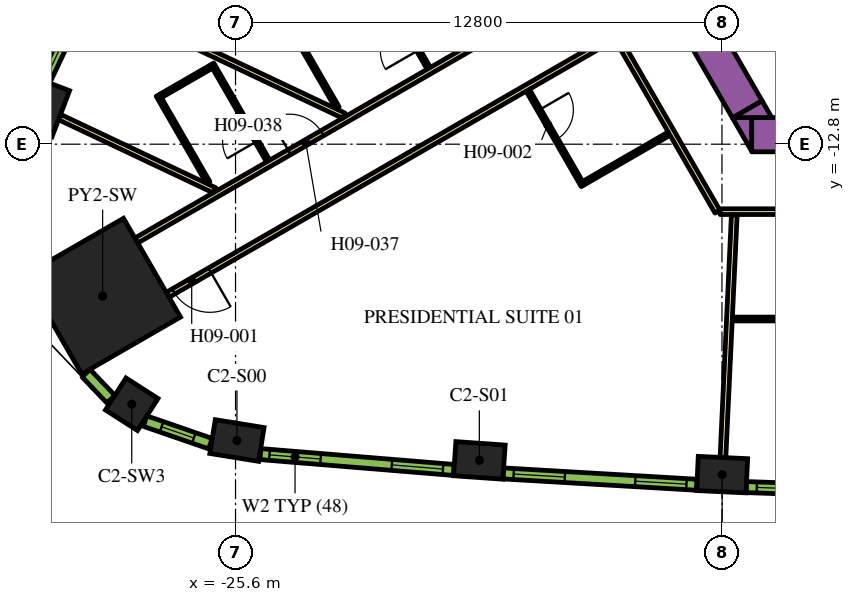
"""IFC4 building model, lengths in metres.
Left out: names, types, materials, properties, quantities, classifications, styles, units other than length and angle.
Written with IfcOpenShell. Run it as: python <this file> out.ifc"""

import sys

from ifc_helpers import new_model, si_unit, direction, frame, frame_2d, origin, origin_2d, place, context, subcontext, project, spatial, polyline, rectangle, outline, extrude, element, fill, save


model = new_model("IFC4")
c1 = context("Model", 3, precision=1e-05, world=origin(), true_north=direction((0.0, 1.0)))
c2 = subcontext(c1, "Body", "Model", "MODEL_VIEW")
j1 = project(units=[si_unit("LENGTHUNIT", "METRE"), si_unit("PLANEANGLEUNIT", "RADIAN")], contexts=[c1])
p1 = place(None, origin())
s1 = spatial("IfcSite", under=j1, at=p1, CompositionType="ELEMENT")
p2 = place(p1, origin())
s2 = spatial("IfcBuilding", under=s1, at=p2, CompositionType="ELEMENT")
p3 = place(p2, frame((0.0, 0.0, 126.6)))
s3 = spatial("IfcBuildingStorey", under=s2, at=p3, CompositionType="ELEMENT", Elevation=126.6)
p4 = place(p3, frame((-29.097, -16.799, 0.0), z_axis=(0.0, 0.0, 1.0), x_axis=(-0.866025403784, -0.5, 0.0)))
e1 = element("IfcColumn", 1, at=p4, inside=s3, PredefinedType="COLUMN", context=c2, shape_type="SweptSolid", body=[
    extrude(rectangle(XDim=3.0, YDim=3.0, at=origin_2d()), origin(), (0.0, 0.0, 1.0), 3.9),
])
for number, where, z_axis, x_axis in (
    (2, (-25.563, -20.597, 0.0), (0.0, 0.0, 1.0), (0.987, -0.159, 0.0)),
    (3, (-19.184, -21.12, 0.0), (0.0, 0.0, 1.0), (0.998, -0.07, 0.0)),
    (4, (-12.795, -21.494, 0.0), (0.0, 0.0, 1.0), (0.999, -0.047, 0.0)),
    (5, (-30.619, -11.839, 0.0), (0.0, 0.0, 1.0), (-0.355, -0.935, 0.0)),
):
    element("IfcColumn", number, at=place(p3, frame(where, z_axis=z_axis, x_axis=x_axis)), inside=s3, PredefinedType="COLUMN", context=c2, shape_type="SweptSolid", body=[
        extrude(rectangle(XDim=1.3, YDim=0.9, at=origin_2d()), origin(), (0.0, 0.0, 1.0), 3.9),
    ])
p5 = place(p3, frame((-28.331, -19.643, 0.0), z_axis=(0.0, 0.0, 1.0), x_axis=(0.841700252504, -0.53994507585, 0.0)))
e6 = element("IfcColumn", 6, at=p5, inside=s3, PredefinedType="COLUMN", context=c2, shape_type="SweptSolid", body=[
    extrude(rectangle(XDim=1.0, YDim=1.0, at=origin_2d()), origin(), (0.0, 0.0, 1.0), 3.9),
])
p6 = place(p3, frame((-12.019, -12.55, 0.0), z_axis=(0.0, 0.0, 1.0), x_axis=(1.0, 0.0, 0.0)))
e7 = element("IfcWall", 7, at=p6, inside=s3, PredefinedType="SOLIDWALL", context=c2, shape_type="SweptSolid", body=[
    extrude(rectangle(XDim=21.63, YDim=0.9, at=frame_2d((10.815, 0.0))), origin(), (0.0, 0.0, 1.0), 3.9),
])
p7 = place(p3, origin())
e8 = element("IfcWall", 8, at=p7, inside=s3, PredefinedType="SOLIDWALL", context=c2, shape_type="SweptSolid", body=[
    extrude(outline(polyline([(-12.529, -12.1), (-12.021, -12.1), (-12.021, -12.98), (-12.529, -12.1)])), origin(), (0.0, 0.0, 1.0), 3.9),
])
p8 = place(p3, frame((-12.134, -11.883, 0.0), z_axis=(0.0, 0.0, 1.0), x_axis=(-0.500005339912, 0.866022320763, 0.0)))
e9 = element("IfcWall", 9, at=p8, inside=s3, PredefinedType="SOLIDWALL", context=c2, shape_type="SweptSolid", body=[
    extrude(rectangle(XDim=9.488, YDim=0.9, at=frame_2d((4.744, 0.0))), origin(), (0.0, 0.0, 1.0), 3.9),
])
e10 = element("IfcWall", 10, at=p7, inside=s3, PredefinedType="SOLIDWALL", context=c2, shape_type="SweptSolid", body=[
    extrude(outline(polyline([(-11.489, -12.1), (-12.505, -12.1), (-11.743, -11.66), (-11.489, -12.1)])), origin(), (0.0, 0.0, 1.0), 3.9),
])
p9 = place(p3, frame((-28.211, -15.335, 0.0), z_axis=(0.0, 0.0, 1.0), x_axis=(0.866025884867, 0.49999916674, 0.0)))
e11 = element("IfcWall", 11, at=p9, inside=s3, PredefinedType="PARTITIONING", context=c2, shape_type="SweptSolid", body=[
    extrude(rectangle(XDim=13.543, YDim=0.15, at=frame_2d((6.772, 0.0))), origin(), (0.0, 0.0, 1.0), 2.75),
])
p10 = place(p9, frame((12.114, 0.0, 0.0)))
e12 = element("IfcOpeningElement", 12, at=p10, cuts=e11, PredefinedType="OPENING", context=c2, shape_type="SweptSolid", body=[
    extrude(rectangle(XDim=1.1, YDim=2.1, at=frame_2d((0.55, 1.05))), frame((0.0, 0.085, 0.0), z_axis=(0.0, -1.0, 0.0), x_axis=(1.0, 0.0, 0.0)), (0.0, 0.0, 1.0), 0.17),
])
p11 = place(p9, frame((4.65, 0.0, 0.0)))
e13 = element("IfcOpeningElement", 13, at=p11, cuts=e11, PredefinedType="OPENING", context=c2, shape_type="SweptSolid", body=[
    extrude(rectangle(XDim=1.0, YDim=2.1, at=frame_2d((0.5, 1.05))), frame((0.0, 0.085, 0.0), z_axis=(0.0, -1.0, 0.0), x_axis=(1.0, 0.0, 0.0)), (0.0, 0.0, 1.0), 0.17),
])
p12 = place(p3, frame((-15.587, -9.952, 0.0), z_axis=(0.0, 0.0, 1.0), x_axis=(-0.866017869832, -0.500013048961, 0.0)))
e14 = element("IfcWall", 14, at=p12, inside=s3, PredefinedType="PARTITIONING", context=c2, shape_type="SweptSolid", body=[
    extrude(rectangle(XDim=13.624, YDim=0.15, at=frame_2d((6.812, 0.0))), origin(), (0.0, 0.0, 1.0), 2.75),
])
p13 = place(p12, frame((12.344, 0.0, 0.0)))
e15 = element("IfcOpeningElement", 15, at=p13, cuts=e14, PredefinedType="OPENING", context=c2, shape_type="SweptSolid", body=[
    extrude(rectangle(XDim=1.1, YDim=2.1, at=frame_2d((0.55, 1.05))), frame((0.0, 0.085, 0.0), z_axis=(0.0, -1.0, 0.0), x_axis=(1.0, 0.0, 0.0)), (0.0, 0.0, 1.0), 0.17),
])
p14 = place(p3, frame((-12.918, -14.575, 0.0), z_axis=(0.0, 0.0, 1.0), x_axis=(-0.500009150678, 0.866020120573, 0.0)))
e16 = element("IfcWall", 16, at=p14, inside=s3, PredefinedType="PARTITIONING", context=c2, shape_type="SweptSolid", body=[
    extrude(rectangle(XDim=5.258, YDim=0.15, at=frame_2d((2.629, 0.0))), origin(), (0.0, 0.0, 1.0), 2.75),
])
p15 = place(p3, frame((12.918, -14.575, 0.0), z_axis=(0.0, 0.0, 1.0), x_axis=(-1.0, 0.0, 0.0)))
e17 = element("IfcWall", 17, at=p15, inside=s3, PredefinedType="PARTITIONING", context=c2, shape_type="SweptSolid", body=[
    extrude(rectangle(XDim=25.766, YDim=0.15, at=frame_2d((12.883, 0.0))), origin(), (0.0, 0.0, 1.0), 2.75),
])
p16 = place(p15, frame((16.189, 0.0, 0.0)))
e18 = element("IfcOpeningElement", 18, at=p16, cuts=e17, PredefinedType="OPENING", context=c2, shape_type="SweptSolid", body=[
    extrude(rectangle(XDim=1.0, YDim=2.1, at=frame_2d((0.5, 1.05))), frame((0.0, 0.085, 0.0), z_axis=(0.0, -1.0, 0.0), x_axis=(1.0, 0.0, 0.0)), (0.0, 0.0, 1.0), 0.17),
])
p17 = place(p15, frame((14.882, 0.0, 0.0)))
e19 = element("IfcOpeningElement", 19, at=p17, cuts=e17, PredefinedType="OPENING", context=c2, shape_type="SweptSolid", body=[
    extrude(rectangle(XDim=1.0, YDim=2.1, at=frame_2d((0.5, 1.05))), frame((0.0, 0.085, 0.0), z_axis=(0.0, -1.0, 0.0), x_axis=(1.0, 0.0, 0.0)), (0.0, 0.0, 1.0), 0.17),
])
p18 = place(p15, frame((0.596, 0.0, 0.0)))
e20 = element("IfcOpeningElement", 20, at=p18, cuts=e17, PredefinedType="OPENING", context=c2, shape_type="SweptSolid", body=[
    extrude(rectangle(XDim=1.1, YDim=2.1, at=frame_2d((0.55, 1.05))), frame((0.0, 0.085, 0.0), z_axis=(0.0, -1.0, 0.0), x_axis=(1.0, 0.0, 0.0)), (0.0, 0.0, 1.0), 0.17),
])
p19 = place(p3, frame((-30.231, -12.085, 0.0), z_axis=(0.0, 0.0, 1.0), x_axis=(0.904001132572, -0.427530060122, 0.0)))
e21 = element("IfcWall", 21, at=p19, inside=s3, PredefinedType="PARTITIONING", context=c2, shape_type="SweptSolid", body=[
    extrude(rectangle(XDim=4.51, YDim=0.15, at=frame_2d((2.255, 0.0))), origin(), (0.0, 0.0, 1.0), 2.75),
])
p20 = place(p3, frame((-29.406, -8.901, 0.0), z_axis=(0.0, 0.0, 1.0), x_axis=(0.904002363742, -0.427527456836, 0.0)))
e22 = element("IfcWall", 22, at=p20, inside=s3, PredefinedType="PARTITIONING", context=c2, shape_type="SweptSolid", body=[
    extrude(rectangle(XDim=7.362, YDim=0.15, at=frame_2d((3.681, 0.0))), origin(), (0.0, 0.0, 1.0), 2.75),
])
p21 = place(p3, frame((-12.774, -21.045, 0.0), z_axis=(0.0, 0.0, 1.0), x_axis=(0.046750341626, 0.998906605023, 0.0)))
e23 = element("IfcWall", 23, at=p21, inside=s3, PredefinedType="PARTITIONING", context=c2, shape_type="SweptSolid", body=[
    extrude(rectangle(XDim=6.392, YDim=0.15, at=frame_2d((3.196, 0.0))), origin(), (0.0, 0.0, 1.0), 2.75),
])
p22 = place(p3, frame((-17.91, -11.38, 0.0), z_axis=(0.0, 0.0, 1.0), x_axis=(0.499987231761, -0.866032775405, 0.0)))
e24 = element("IfcWall", 24, at=p22, inside=s3, PredefinedType="PARTITIONING", context=c2, shape_type="SweptSolid", body=[
    extrude(rectangle(XDim=2.9, YDim=0.1, at=frame_2d((1.45, 0.0))), origin(), (0.0, 0.0, 1.0), 2.75),
])
p23 = place(p22, frame((0.6, 0.0, 0.0)))
e25 = element("IfcOpeningElement", 25, at=p23, cuts=e24, PredefinedType="OPENING", context=c2, shape_type="SweptSolid", body=[
    extrude(rectangle(XDim=0.9, YDim=2.1, at=frame_2d((0.45, 1.05))), frame((0.0, 0.06, 0.0), z_axis=(0.0, -1.0, 0.0), x_axis=(1.0, 0.0, 0.0)), (0.0, 0.0, 1.0), 0.12),
])
p24 = place(p3, frame((-16.442, -13.823, 0.0), z_axis=(0.0, 0.0, 1.0), x_axis=(0.866021400173, 0.500006934395, 0.0)))
e26 = element("IfcWall", 26, at=p24, inside=s3, PredefinedType="PARTITIONING", context=c2, shape_type="SweptSolid", body=[
    extrude(rectangle(XDim=2.6, YDim=0.1, at=frame_2d((1.3, 0.0))), origin(), (0.0, 0.0, 1.0), 2.75),
])
p25 = place(p3, frame((-10.072, -17.4, 0.0), z_axis=(0.0, 0.0, 1.0), x_axis=(-1.0, 0.0, 0.0)))
e27 = element("IfcWall", 27, at=p25, inside=s3, PredefinedType="PARTITIONING", context=c2, shape_type="SweptSolid", body=[
    extrude(rectangle(XDim=2.45, YDim=0.1, at=frame_2d((1.225, 0.0))), origin(), (0.0, 0.0, 1.0), 2.75),
])
p26 = place(p3, frame((-20.515, -10.805, 0.0), z_axis=(0.0, 0.0, 1.0), x_axis=(-0.49994636267, 0.866056369097, 0.0)))
e28 = element("IfcWall", 28, at=p26, inside=s3, PredefinedType="PARTITIONING", context=c2, shape_type="SweptSolid", body=[
    extrude(rectangle(XDim=2.8, YDim=0.1, at=frame_2d((1.4, 0.0))), origin(), (0.0, 0.0, 1.0), 2.75),
])
p27 = place(p26, frame((0.55, 0.0, 0.0)))
e29 = element("IfcOpeningElement", 29, at=p27, cuts=e28, PredefinedType="OPENING", context=c2, shape_type="SweptSolid", body=[
    extrude(rectangle(XDim=1.0, YDim=2.1, at=frame_2d((0.5, 1.05))), frame((0.0, 0.06, 0.0), z_axis=(0.0, -1.0, 0.0), x_axis=(1.0, 0.0, 0.0)), (0.0, 0.0, 1.0), 0.12),
])
p28 = place(p3, frame((-22.916, -11.845, 0.0), z_axis=(0.0, 0.0, 1.0), x_axis=(-0.500004234368, 0.866022959057, 0.0)))
e30 = element("IfcWall", 30, at=p28, inside=s3, PredefinedType="PARTITIONING", context=c2, shape_type="SweptSolid", body=[
    extrude(rectangle(XDim=2.5, YDim=0.1, at=frame_2d((1.25, 0.0))), origin(), (0.0, 0.0, 1.0), 2.75),
])
p29 = place(p3, frame((-24.74, -13.244, 0.0), z_axis=(0.0, 0.0, 1.0), x_axis=(-0.500037662692, 0.866003658127, 0.0)))
e31 = element("IfcWall", 31, at=p29, inside=s3, PredefinedType="PARTITIONING", context=c2, shape_type="SweptSolid", body=[
    extrude(rectangle(XDim=2.95, YDim=0.1, at=frame_2d((1.475, 0.0))), origin(), (0.0, 0.0, 1.0), 2.75),
])
p30 = place(p29, frame((0.6, 0.0, 0.0)))
e32 = element("IfcOpeningElement", 32, at=p30, cuts=e31, PredefinedType="OPENING", context=c2, shape_type="SweptSolid", body=[
    extrude(rectangle(XDim=0.9, YDim=2.1, at=frame_2d((0.45, 1.05))), frame((0.0, 0.06, 0.0), z_axis=(0.0, -1.0, 0.0), x_axis=(1.0, 0.0, 0.0)), (0.0, 0.0, 1.0), 0.12),
])
p31 = place(p3, frame((-26.233, -10.758, 0.0), z_axis=(0.0, 0.0, 1.0), x_axis=(-0.866043940782, -0.499967891604, 0.0)))
e33 = element("IfcWall", 33, at=p31, inside=s3, PredefinedType="PARTITIONING", context=c2, shape_type="SweptSolid", body=[
    extrude(rectangle(XDim=1.55, YDim=0.1, at=frame_2d((0.775, 0.0))), origin(), (0.0, 0.0, 1.0), 2.75),
])
p32 = place(p3, frame((-26.319, -13.81, 0.0), z_axis=(0.0, 0.0, 1.0), x_axis=(-0.499953715521, 0.866052124492, 0.0)))
e34 = element("IfcWall", 34, at=p32, inside=s3, PredefinedType="PARTITIONING", context=c2, shape_type="SweptSolid", body=[
    extrude(rectangle(XDim=2.65, YDim=0.1, at=frame_2d((1.325, 0.0))), origin(), (0.0, 0.0, 1.0), 2.75),
])
p33 = place(p3, frame((-24.946, -20.954, 0.0), z_axis=(0.0, 0.0, 1.0), x_axis=(0.99665273362, -0.081751627308, 0.0)))
e35 = element("IfcWall", 35, at=p33, inside=s3, PredefinedType="SOLIDWALL", context=c2, shape_type="SweptSolid", body=[
    extrude(rectangle(XDim=5.107, YDim=0.29, at=frame_2d((2.553, 0.0))), origin(), (0.0, 0.0, 1.0), 3.65),
])
p34 = place(p33, frame((0.24, 0.0, 0.9)))
e36 = element("IfcOpeningElement", 36, at=p34, cuts=e35, PredefinedType="OPENING", context=c2, shape_type="SweptSolid", body=[
    extrude(rectangle(XDim=1.35, YDim=2.15, at=frame_2d((0.675, 1.075))), frame((0.0, 0.155, 0.0), z_axis=(0.0, -1.0, 0.0), x_axis=(1.0, 0.0, 0.0)), (0.0, 0.0, 1.0), 0.31),
])
p35 = place(p33, frame((3.471, 0.0, 0.9)))
e37 = element("IfcOpeningElement", 37, at=p35, cuts=e35, PredefinedType="OPENING", context=c2, shape_type="SweptSolid", body=[
    extrude(rectangle(XDim=1.35, YDim=2.15, at=frame_2d((0.675, 1.075))), frame((0.0, 0.155, 0.0), z_axis=(0.0, -1.0, 0.0), x_axis=(1.0, 0.0, 0.0)), (0.0, 0.0, 1.0), 0.31),
])
p36 = place(p3, frame((-18.553, -21.463, 0.0), z_axis=(0.0, 0.0, 1.0), x_axis=(0.998290511436, -0.058447025388, 0.0)))
e38 = element("IfcWall", 38, at=p36, inside=s3, PredefinedType="SOLIDWALL", context=c2, shape_type="SweptSolid", body=[
    extrude(rectangle(XDim=5.1, YDim=0.29, at=frame_2d((2.55, 0.0))), origin(), (0.0, 0.0, 1.0), 3.65),
])
p37 = place(p36, frame((0.273, 0.0, 0.9)))
e39 = element("IfcOpeningElement", 39, at=p37, cuts=e38, PredefinedType="OPENING", context=c2, shape_type="SweptSolid", body=[
    extrude(rectangle(XDim=1.35, YDim=2.15, at=frame_2d((0.675, 1.075))), frame((0.0, 0.155, 0.0), z_axis=(0.0, -1.0, 0.0), x_axis=(1.0, 0.0, 0.0)), (0.0, 0.0, 1.0), 0.31),
])
p38 = place(p36, frame((3.478, 0.0, 0.9)))
e40 = element("IfcOpeningElement", 40, at=p38, cuts=e38, PredefinedType="OPENING", context=c2, shape_type="SweptSolid", body=[
    extrude(rectangle(XDim=1.35, YDim=2.15, at=frame_2d((0.675, 1.075))), frame((0.0, 0.155, 0.0), z_axis=(0.0, -1.0, 0.0), x_axis=(1.0, 0.0, 0.0)), (0.0, 0.0, 1.0), 0.31),
])
p39 = place(p3, frame((-12.157, -21.822, 0.0), z_axis=(0.0, 0.0, 1.0), x_axis=(0.999385993957, -0.035037623812, 0.0)))
e41 = element("IfcWall", 41, at=p39, inside=s3, PredefinedType="SOLIDWALL", context=c2, shape_type="SweptSolid", body=[
    extrude(rectangle(XDim=5.101, YDim=0.29, at=frame_2d((2.55, 0.0))), origin(), (0.0, 0.0, 1.0), 3.65),
])
p40 = place(p39, frame((0.273, 0.0, 0.9)))
e42 = element("IfcOpeningElement", 42, at=p40, cuts=e41, PredefinedType="OPENING", context=c2, shape_type="SweptSolid", body=[
    extrude(rectangle(XDim=1.35, YDim=2.15, at=frame_2d((0.675, 1.075))), frame((0.0, 0.155, 0.0), z_axis=(0.0, -1.0, 0.0), x_axis=(1.0, 0.0, 0.0)), (0.0, 0.0, 1.0), 0.31),
])
p41 = place(p39, frame((3.478, 0.0, 0.9)))
e43 = element("IfcOpeningElement", 43, at=p41, cuts=e41, PredefinedType="OPENING", context=c2, shape_type="SweptSolid", body=[
    extrude(rectangle(XDim=1.35, YDim=2.15, at=frame_2d((0.675, 1.075))), frame((0.0, 0.155, 0.0), z_axis=(0.0, -1.0, 0.0), x_axis=(1.0, 0.0, 0.0)), (0.0, 0.0, 1.0), 0.31),
])
p42 = place(p3, frame((-28.436, -6.511, 0.0), z_axis=(0.0, 0.0, 1.0), x_axis=(-0.427543726596, -0.903994669148, 0.0)))
e44 = element("IfcWall", 44, at=p42, inside=s3, PredefinedType="SOLIDWALL", context=c2, shape_type="SweptSolid", body=[
    extrude(rectangle(XDim=5.107, YDim=0.29, at=frame_2d((2.553, 0.0))), origin(), (0.0, 0.0, 1.0), 3.65),
])
p43 = place(p42, frame((0.285, 0.0, 0.9)))
e45 = element("IfcOpeningElement", 45, at=p43, cuts=e44, PredefinedType="OPENING", context=c2, shape_type="SweptSolid", body=[
    extrude(rectangle(XDim=1.35, YDim=2.15, at=frame_2d((0.675, 1.075))), frame((0.0, 0.155, 0.0), z_axis=(0.0, -1.0, 0.0), x_axis=(1.0, 0.0, 0.0)), (0.0, 0.0, 1.0), 0.31),
])
p44 = place(p42, frame((3.516, 0.0, 0.9)))
e46 = element("IfcOpeningElement", 46, at=p44, cuts=e44, PredefinedType="OPENING", context=c2, shape_type="SweptSolid", body=[
    extrude(rectangle(XDim=1.35, YDim=2.15, at=frame_2d((0.675, 1.075))), frame((0.0, 0.155, 0.0), z_axis=(0.0, -1.0, 0.0), x_axis=(1.0, 0.0, 0.0)), (0.0, 0.0, 1.0), 0.31),
])
p45 = place(p3, frame((-29.534, -18.824, 0.0), z_axis=(0.0, 0.0, 1.0), x_axis=(0.690414427296, -0.723414071319, 0.0)))
e47 = element("IfcWall", 47, at=p45, inside=s3, PredefinedType="SOLIDWALL", context=c2, shape_type="SweptSolid", body=[
    extrude(rectangle(XDim=0.947, YDim=0.29, at=frame_2d((0.474, 0.0))), origin(), (0.0, 0.0, 1.0), 3.65),
])
p46 = place(p3, frame((-27.981, -20.086, 0.0), z_axis=(0.0, 0.0, 1.0), x_axis=(0.945385815453, -0.325953462844, 0.0)))
e48 = element("IfcWall", 48, at=p46, inside=s3, PredefinedType="SOLIDWALL", context=c2, shape_type="SweptSolid", body=[
    extrude(rectangle(XDim=1.819, YDim=0.29, at=frame_2d((0.91, 0.0))), origin(), (0.0, 0.0, 1.0), 3.65),
])
p47 = place(p46, frame((0.46, 0.0, 0.9)))
e49 = element("IfcOpeningElement", 49, at=p47, cuts=e48, PredefinedType="OPENING", context=c2, shape_type="SweptSolid", body=[
    extrude(rectangle(XDim=0.9, YDim=2.15, at=frame_2d((0.45, 1.075))), frame((0.0, 0.155, 0.0), z_axis=(0.0, -1.0, 0.0), x_axis=(1.0, 0.0, 0.0)), (0.0, 0.0, 1.0), 0.31),
])
p48 = place(p13, origin())
e50 = element("IfcDoor", 50, at=p48, inside=s3, OperationType="SINGLE_SWING_RIGHT", PredefinedType="DOOR", context=c2, shape_type="SweptSolid", body=[
    extrude(rectangle(XDim=1.1, YDim=2.1, at=frame_2d((0.55, 1.05))), frame((0.0, 0.025, 0.0), z_axis=(0.0, -1.0, 0.0), x_axis=(1.0, 0.0, 0.0)), (0.0, 0.0, 1.0), 0.05),
])
fill(e15, e50)
p49 = place(p23, origin())
e51 = element("IfcDoor", 51, at=p49, inside=s3, OperationType="SINGLE_SWING_LEFT", PredefinedType="DOOR", context=c2, shape_type="SweptSolid", body=[
    extrude(rectangle(XDim=0.9, YDim=2.1, at=frame_2d((0.45, 1.05))), frame((0.0, 0.025, 0.0), z_axis=(0.0, -1.0, 0.0), x_axis=(1.0, 0.0, 0.0)), (0.0, 0.0, 1.0), 0.05),
])
fill(e25, e51)
p50 = place(p11, origin())
e52 = element("IfcDoor", 52, at=p50, inside=s3, OperationType="SINGLE_SWING_RIGHT", PredefinedType="DOOR", context=c2, shape_type="SweptSolid", body=[
    extrude(rectangle(XDim=1.0, YDim=2.1, at=frame_2d((0.5, 1.05))), frame((0.0, 0.025, 0.0), z_axis=(0.0, -1.0, 0.0), x_axis=(1.0, 0.0, 0.0)), (0.0, 0.0, 1.0), 0.05),
])
fill(e13, e52)
p51 = place(p30, origin())
e53 = element("IfcDoor", 53, at=p51, inside=s3, OperationType="SINGLE_SWING_LEFT", PredefinedType="DOOR", context=c2, shape_type="SweptSolid", body=[
    extrude(rectangle(XDim=0.9, YDim=2.1, at=frame_2d((0.45, 1.05))), frame((0.0, 0.025, 0.0), z_axis=(0.0, -1.0, 0.0), x_axis=(1.0, 0.0, 0.0)), (0.0, 0.0, 1.0), 0.05),
])
fill(e32, e53)
p52 = place(p34, origin())
e54 = element("IfcWindow", 54, at=p52, inside=s3, PartitioningType="DOUBLE_PANEL_VERTICAL", PredefinedType="WINDOW", context=c2, shape_type="SweptSolid", body=[
    extrude(rectangle(XDim=1.35, YDim=2.15, at=frame_2d((0.675, 1.075))), frame((0.0, 0.015, 0.0), z_axis=(0.0, -1.0, 0.0), x_axis=(1.0, 0.0, 0.0)), (0.0, 0.0, 1.0), 0.06),
])
fill(e36, e54)
p53 = place(p35, origin())
e55 = element("IfcWindow", 55, at=p53, inside=s3, PartitioningType="DOUBLE_PANEL_VERTICAL", PredefinedType="WINDOW", context=c2, shape_type="SweptSolid", body=[
    extrude(rectangle(XDim=1.35, YDim=2.15, at=frame_2d((0.675, 1.075))), frame((0.0, 0.015, 0.0), z_axis=(0.0, -1.0, 0.0), x_axis=(1.0, 0.0, 0.0)), (0.0, 0.0, 1.0), 0.06),
])
fill(e37, e55)
p54 = place(p37, origin())
e56 = element("IfcWindow", 56, at=p54, inside=s3, PartitioningType="DOUBLE_PANEL_VERTICAL", PredefinedType="WINDOW", context=c2, shape_type="SweptSolid", body=[
    extrude(rectangle(XDim=1.35, YDim=2.15, at=frame_2d((0.675, 1.075))), frame((0.0, 0.015, 0.0), z_axis=(0.0, -1.0, 0.0), x_axis=(1.0, 0.0, 0.0)), (0.0, 0.0, 1.0), 0.06),
])
fill(e39, e56)
p55 = place(p38, origin())
e57 = element("IfcWindow", 57, at=p55, inside=s3, PartitioningType="DOUBLE_PANEL_VERTICAL", PredefinedType="WINDOW", context=c2, shape_type="SweptSolid", body=[
    extrude(rectangle(XDim=1.35, YDim=2.15, at=frame_2d((0.675, 1.075))), frame((0.0, 0.015, 0.0), z_axis=(0.0, -1.0, 0.0), x_axis=(1.0, 0.0, 0.0)), (0.0, 0.0, 1.0), 0.06),
])
fill(e40, e57)
p56 = place(p40, origin())
e58 = element("IfcWindow", 58, at=p56, inside=s3, PartitioningType="DOUBLE_PANEL_VERTICAL", PredefinedType="WINDOW", context=c2, shape_type="SweptSolid", body=[
    extrude(rectangle(XDim=1.35, YDim=2.15, at=frame_2d((0.675, 1.075))), frame((0.0, 0.015, 0.0), z_axis=(0.0, -1.0, 0.0), x_axis=(1.0, 0.0, 0.0)), (0.0, 0.0, 1.0), 0.06),
])
fill(e42, e58)
p57 = place(p44, origin())
e59 = element("IfcWindow", 59, at=p57, inside=s3, PartitioningType="DOUBLE_PANEL_VERTICAL", PredefinedType="WINDOW", context=c2, shape_type="SweptSolid", body=[
    extrude(rectangle(XDim=1.35, YDim=2.15, at=frame_2d((0.675, 1.075))), frame((0.0, 0.015, 0.0), z_axis=(0.0, -1.0, 0.0), x_axis=(1.0, 0.0, 0.0)), (0.0, 0.0, 1.0), 0.06),
])
fill(e46, e59)
p58 = place(p47, origin())
e60 = element("IfcWindow", 60, at=p58, inside=s3, PartitioningType="SINGLE_PANEL", PredefinedType="WINDOW", context=c2, shape_type="SweptSolid", body=[
    extrude(rectangle(XDim=0.9, YDim=2.15, at=frame_2d((0.45, 1.075))), frame((0.0, 0.015, 0.0), z_axis=(0.0, -1.0, 0.0), x_axis=(1.0, 0.0, 0.0)), (0.0, 0.0, 1.0), 0.06),
])
fill(e49, e60)
save(model, sys.argv[1])
